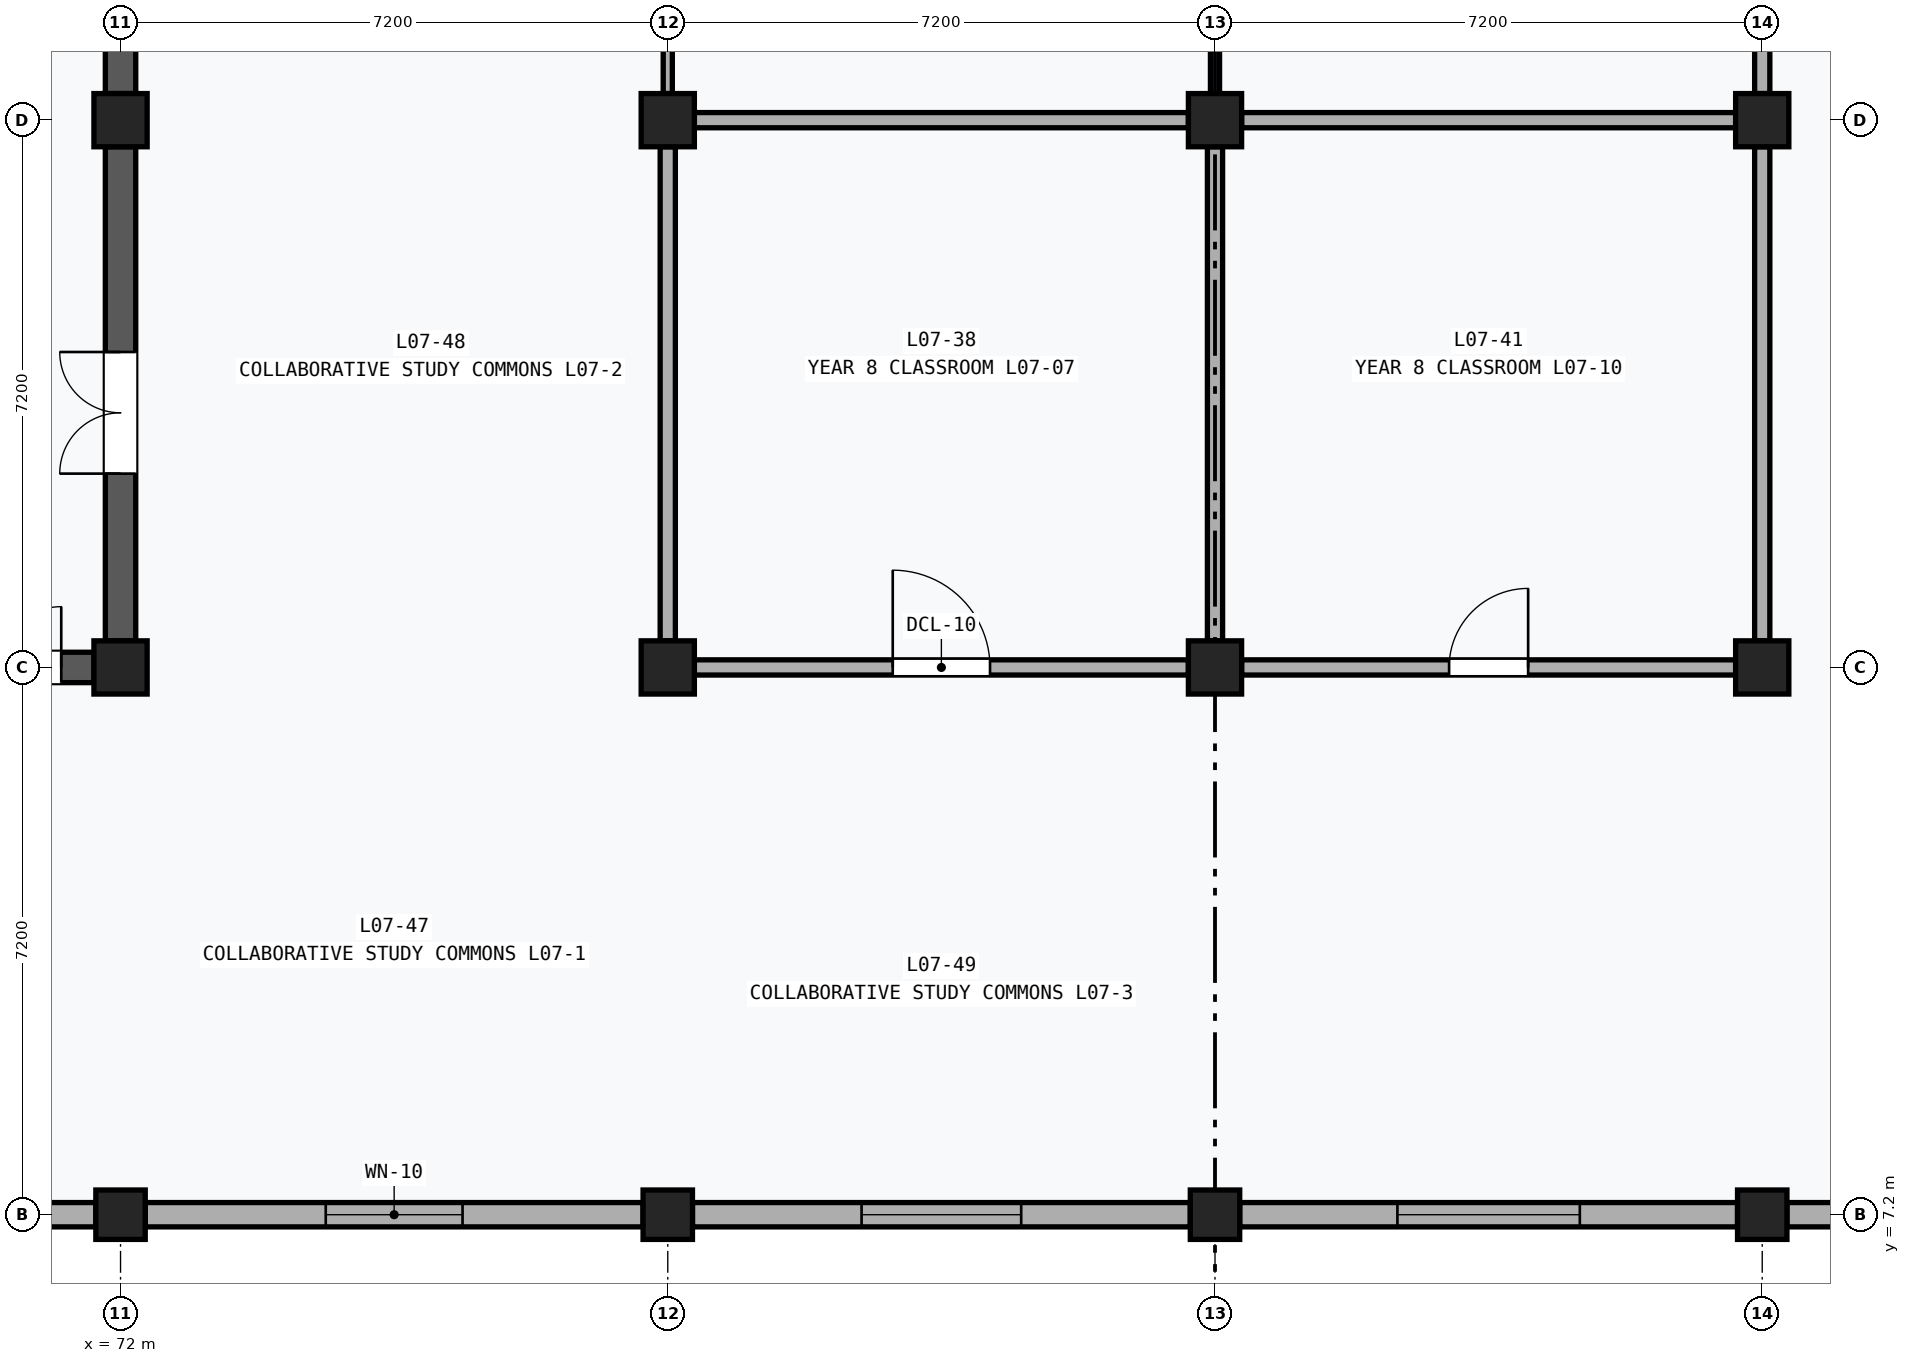
"""IFC4 building model, lengths in metres.
Left out: names, types, materials, properties, quantities, classifications, styles, units other than length and angle.
Written with IfcOpenShell. Run it as: python <this file> out.ifc"""

import sys

from ifc_helpers import new_model, si_unit, direction, frame, frame_2d, origin, origin_2d, place, context, subcontext, project, spatial, rectangle, extrude, element, fill, save


model = new_model("IFC4")
c1 = context("Model", 3, precision=1e-05, world=origin(), true_north=direction((0.0, 1.0)))
c2 = subcontext(c1, "Body", "Model", "MODEL_VIEW")
j1 = project(units=[si_unit("LENGTHUNIT", "METRE"), si_unit("PLANEANGLEUNIT", "RADIAN")], contexts=[c1])
p1 = place(None, origin())
s1 = spatial("IfcSite", under=j1, at=p1, CompositionType="ELEMENT")
p2 = place(p1, origin())
s2 = spatial("IfcBuilding", under=s1, at=p2, CompositionType="ELEMENT")
p3 = place(p2, frame((0.0, 0.0, 30.6)))
s3 = spatial("IfcBuildingStorey", under=s2, at=p3, CompositionType="ELEMENT", Elevation=30.6)
p4 = place(p3, frame((72.0, 7.2, 0.0), z_axis=(0.0, 0.0, 1.0), x_axis=(1.0, 0.0, 0.0)))
e1 = element("IfcColumn", 1, at=p4, inside=s3, PredefinedType="COLUMN", context=c2, shape_type="SweptSolid", body=[
    extrude(rectangle(XDim=0.65, YDim=0.65, at=origin_2d()), origin(), (0.0, 0.0, 1.0), 4.2),
])
for number, where, z_axis, x_axis in (
    (2, (72.0, 14.4, 0.0), (0.0, 0.0, 1.0), (1.0, 0.0, 0.0)),
    (3, (72.0, 21.6, 0.0), (0.0, 0.0, 1.0), (1.0, 0.0, 0.0)),
):
    element("IfcColumn", number, at=place(p3, frame(where, z_axis=z_axis, x_axis=x_axis)), inside=s3, PredefinedType="COLUMN", context=c2, shape_type="SweptSolid", body=[
        extrude(rectangle(XDim=0.7, YDim=0.7, at=origin_2d()), origin(), (0.0, 0.0, 1.0), 4.2),
    ])
p5 = place(p3, frame((79.2, 7.2, 0.0), z_axis=(0.0, 0.0, 1.0), x_axis=(1.0, 0.0, 0.0)))
e4 = element("IfcColumn", 4, at=p5, inside=s3, PredefinedType="COLUMN", context=c2, shape_type="SweptSolid", body=[
    extrude(rectangle(XDim=0.65, YDim=0.65, at=origin_2d()), origin(), (0.0, 0.0, 1.0), 4.2),
])
for number, where, z_axis, x_axis in (
    (5, (79.2, 14.4, 0.0), (0.0, 0.0, 1.0), (1.0, 0.0, 0.0)),
    (6, (79.2, 21.6, 0.0), (0.0, 0.0, 1.0), (1.0, 0.0, 0.0)),
):
    element("IfcColumn", number, at=place(p3, frame(where, z_axis=z_axis, x_axis=x_axis)), inside=s3, PredefinedType="COLUMN", context=c2, shape_type="SweptSolid", body=[
        extrude(rectangle(XDim=0.7, YDim=0.7, at=origin_2d()), origin(), (0.0, 0.0, 1.0), 4.2),
    ])
p6 = place(p3, frame((86.4, 7.2, 0.0), z_axis=(0.0, 0.0, 1.0), x_axis=(1.0, 0.0, 0.0)))
e7 = element("IfcColumn", 7, at=p6, inside=s3, PredefinedType="COLUMN", context=c2, shape_type="SweptSolid", body=[
    extrude(rectangle(XDim=0.65, YDim=0.65, at=origin_2d()), origin(), (0.0, 0.0, 1.0), 4.2),
])
for number, where, z_axis, x_axis in (
    (8, (86.4, 14.4, 0.0), (0.0, 0.0, 1.0), (1.0, 0.0, 0.0)),
    (9, (86.4, 21.6, 0.0), (0.0, 0.0, 1.0), (1.0, 0.0, 0.0)),
):
    element("IfcColumn", number, at=place(p3, frame(where, z_axis=z_axis, x_axis=x_axis)), inside=s3, PredefinedType="COLUMN", context=c2, shape_type="SweptSolid", body=[
        extrude(rectangle(XDim=0.7, YDim=0.7, at=origin_2d()), origin(), (0.0, 0.0, 1.0), 4.2),
    ])
p7 = place(p3, frame((93.6, 7.2, 0.0), z_axis=(0.0, 0.0, 1.0), x_axis=(1.0, 0.0, 0.0)))
e10 = element("IfcColumn", 10, at=p7, inside=s3, PredefinedType="COLUMN", context=c2, shape_type="SweptSolid", body=[
    extrude(rectangle(XDim=0.65, YDim=0.65, at=origin_2d()), origin(), (0.0, 0.0, 1.0), 4.2),
])
for number, where, z_axis, x_axis in (
    (11, (93.6, 14.4, 0.0), (0.0, 0.0, 1.0), (1.0, 0.0, 0.0)),
    (12, (93.6, 21.6, 0.0), (0.0, 0.0, 1.0), (1.0, 0.0, 0.0)),
):
    element("IfcColumn", number, at=place(p3, frame(where, z_axis=z_axis, x_axis=x_axis)), inside=s3, PredefinedType="COLUMN", context=c2, shape_type="SweptSolid", body=[
        extrude(rectangle(XDim=0.7, YDim=0.7, at=origin_2d()), origin(), (0.0, 0.0, 1.0), 4.2),
    ])
p8 = place(p3, frame((65.05, 7.2, 0.0), z_axis=(0.0, 0.0, 1.0), x_axis=(1.0, 0.0, 0.0)))
e13 = element("IfcWall", 13, at=p8, inside=s3, PredefinedType="SOLIDWALL", context=c2, shape_type="SweptSolid", body=[
    extrude(rectangle(XDim=6.625, YDim=0.32, at=frame_2d((3.312, 0.0))), origin(), (0.0, 0.0, 1.0), 3.25),
])
p9 = place(p8, frame((1.613, 0.0, 0.9)))
e14 = element("IfcOpeningElement", 14, at=p9, cuts=e13, PredefinedType="OPENING", context=c2, shape_type="SweptSolid", body=[
    extrude(rectangle(XDim=3.4, YDim=1.8, at=frame_2d((1.7, 0.9))), frame((0.0, 0.172, 0.0), z_axis=(0.0, -1.0, 0.0), x_axis=(1.0, 0.0, 0.0)), (0.0, 0.0, 1.0), 0.344),
])
p10 = place(p3, frame((72.325, 7.2, 0.0), z_axis=(0.0, 0.0, 1.0), x_axis=(1.0, 0.0, 0.0)))
e15 = element("IfcWall", 15, at=p10, inside=s3, PredefinedType="SOLIDWALL", context=c2, shape_type="SweptSolid", body=[
    extrude(rectangle(XDim=6.55, YDim=0.32, at=frame_2d((3.275, 0.0))), origin(), (0.0, 0.0, 1.0), 3.25),
])
p11 = place(p10, frame((2.375, 0.0, 0.85)))
e16 = element("IfcOpeningElement", 16, at=p11, cuts=e15, PredefinedType="OPENING", context=c2, shape_type="SweptSolid", body=[
    extrude(rectangle(XDim=1.8, YDim=2.0, at=frame_2d((0.9, 1.0))), frame((0.0, 0.172, 0.0), z_axis=(0.0, -1.0, 0.0), x_axis=(1.0, 0.0, 0.0)), (0.0, 0.0, 1.0), 0.344),
])
p12 = place(p3, frame((79.525, 7.2, 0.0), z_axis=(0.0, 0.0, 1.0), x_axis=(1.0, 0.0, 0.0)))
e17 = element("IfcWall", 17, at=p12, inside=s3, PredefinedType="SOLIDWALL", context=c2, shape_type="SweptSolid", body=[
    extrude(rectangle(XDim=6.55, YDim=0.32, at=frame_2d((3.275, 0.0))), origin(), (0.0, 0.0, 1.0), 3.25),
])
p13 = place(p12, frame((2.225, 0.0, 0.85)))
e18 = element("IfcOpeningElement", 18, at=p13, cuts=e17, PredefinedType="OPENING", context=c2, shape_type="SweptSolid", body=[
    extrude(rectangle(XDim=2.1, YDim=2.0, at=frame_2d((1.05, 1.0))), frame((0.0, 0.172, 0.0), z_axis=(0.0, -1.0, 0.0), x_axis=(1.0, 0.0, 0.0)), (0.0, 0.0, 1.0), 0.344),
])
p14 = place(p3, frame((86.725, 7.2, 0.0), z_axis=(0.0, 0.0, 1.0), x_axis=(1.0, 0.0, 0.0)))
e19 = element("IfcWall", 19, at=p14, inside=s3, PredefinedType="SOLIDWALL", context=c2, shape_type="SweptSolid", body=[
    extrude(rectangle(XDim=6.55, YDim=0.32, at=frame_2d((3.275, 0.0))), origin(), (0.0, 0.0, 1.0), 3.25),
])
p15 = place(p14, frame((2.075, 0.0, 0.85)))
e20 = element("IfcOpeningElement", 20, at=p15, cuts=e19, PredefinedType="OPENING", context=c2, shape_type="SweptSolid", body=[
    extrude(rectangle(XDim=2.4, YDim=2.0, at=frame_2d((1.2, 1.0))), frame((0.0, 0.172, 0.0), z_axis=(0.0, -1.0, 0.0), x_axis=(1.0, 0.0, 0.0)), (0.0, 0.0, 1.0), 0.344),
])
p16 = place(p3, frame((93.925, 7.2, 0.0), z_axis=(0.0, 0.0, 1.0), x_axis=(1.0, 0.0, 0.0)))
e21 = element("IfcWall", 21, at=p16, inside=s3, PredefinedType="SOLIDWALL", context=c2, shape_type="SweptSolid", body=[
    extrude(rectangle(XDim=6.625, YDim=0.32, at=frame_2d((3.312, 0.0))), origin(), (0.0, 0.0, 1.0), 3.25),
])
p17 = place(p16, frame((1.962, 0.0, 0.85)))
e22 = element("IfcOpeningElement", 22, at=p17, cuts=e21, PredefinedType="OPENING", context=c2, shape_type="SweptSolid", body=[
    extrude(rectangle(XDim=2.7, YDim=2.0, at=frame_2d((1.35, 1.0))), frame((0.0, 0.172, 0.0), z_axis=(0.0, -1.0, 0.0), x_axis=(1.0, 0.0, 0.0)), (0.0, 0.0, 1.0), 0.344),
])
p18 = place(p3, frame((72.0, 14.75, 0.0), z_axis=(0.0, 0.0, 1.0), x_axis=(0.0, 1.0, 0.0)))
e23 = element("IfcWall", 23, at=p18, inside=s3, PredefinedType="SHEAR", context=c2, shape_type="SweptSolid", body=[
    extrude(rectangle(XDim=6.5, YDim=0.4, at=frame_2d((3.25, 0.0))), origin(), (0.0, 0.0, 1.0), 3.11),
])
p19 = place(p18, frame((2.2, 0.0, 0.0)))
e24 = element("IfcOpeningElement", 24, at=p19, cuts=e23, PredefinedType="OPENING", context=c2, shape_type="SweptSolid", body=[
    extrude(rectangle(XDim=1.6, YDim=2.2, at=frame_2d((0.8, 1.1))), frame((0.0, 0.212, 0.0), z_axis=(0.0, -1.0, 0.0), x_axis=(1.0, 0.0, 0.0)), (0.0, 0.0, 1.0), 0.424),
])
p20 = place(p3, frame((72.0, 21.95, 0.0), z_axis=(0.0, 0.0, 1.0), x_axis=(0.0, 1.0, 0.0)))
e25 = element("IfcWall", 25, at=p20, inside=s3, PredefinedType="SHEAR", context=c2, shape_type="SweptSolid", body=[
    extrude(rectangle(XDim=6.5, YDim=0.4, at=frame_2d((3.25, 0.0))), origin(), (0.0, 0.0, 1.0), 3.11),
])
p21 = place(p3, frame((65.15, 14.4, 0.0), z_axis=(0.0, 0.0, 1.0), x_axis=(1.0, 0.0, 0.0)))
e26 = element("IfcWall", 26, at=p21, inside=s3, PredefinedType="SHEAR", context=c2, shape_type="SweptSolid", body=[
    extrude(rectangle(XDim=6.5, YDim=0.4, at=frame_2d((3.25, 0.0))), origin(), (0.0, 0.0, 1.0), 3.11),
])
p22 = place(p21, frame((4.47, 0.0, 0.0)))
e27 = element("IfcOpeningElement", 27, at=p22, cuts=e26, PredefinedType="OPENING", context=c2, shape_type="SweptSolid", body=[
    extrude(rectangle(XDim=1.6, YDim=2.2, at=frame_2d((0.8, 1.1))), frame((0.0, 0.212, 0.0), z_axis=(0.0, -1.0, 0.0), x_axis=(1.0, 0.0, 0.0)), (0.0, 0.0, 1.0), 0.424),
])
p23 = place(p3, frame((79.55, 14.4, 0.0), z_axis=(0.0, 0.0, 1.0), x_axis=(1.0, 0.0, 0.0)))
e28 = element("IfcWall", 28, at=p23, inside=s3, PredefinedType="PARTITIONING", context=c2, shape_type="SweptSolid", body=[
    extrude(rectangle(XDim=6.5, YDim=0.2, at=frame_2d((3.25, 0.0))), origin(), (0.0, 0.0, 1.0), 3.11),
])
p24 = place(p23, frame((2.61, 0.0, 0.0)))
e29 = element("IfcOpeningElement", 29, at=p24, cuts=e28, PredefinedType="OPENING", context=c2, shape_type="SweptSolid", body=[
    extrude(rectangle(XDim=1.28, YDim=2.28, at=frame_2d((0.64, 1.14))), frame((0.0, 0.112, 0.0), z_axis=(0.0, -1.0, 0.0), x_axis=(1.0, 0.0, 0.0)), (0.0, 0.0, 1.0), 0.224),
])
for number, where, z_axis, x_axis in (
    (30, (79.55, 21.6, 0.0), (0.0, 0.0, 1.0), (1.0, 0.0, 0.0)),
    (31, (79.2, 14.75, 0.0), (0.0, 0.0, 1.0), (0.0, 1.0, 0.0)),
    (32, (86.4, 14.75, 0.0), (0.0, 0.0, 1.0), (0.0, 1.0, 0.0)),
):
    element("IfcWall", number, at=place(p3, frame(where, z_axis=z_axis, x_axis=x_axis)), inside=s3, PredefinedType="PARTITIONING", context=c2, shape_type="SweptSolid", body=[
        extrude(rectangle(XDim=6.5, YDim=0.2, at=frame_2d((3.25, 0.0))), origin(), (0.0, 0.0, 1.0), 3.11),
    ])
p25 = place(p3, frame((79.2, 21.95, 0.0), z_axis=(0.0, 0.0, 1.0), x_axis=(0.0, 1.0, 0.0)))
e33 = element("IfcWall", 33, at=p25, inside=s3, PredefinedType="MOVABLE", context=c2, shape_type="SweptSolid", body=[
    extrude(rectangle(XDim=6.5, YDim=0.12, at=frame_2d((3.25, 0.0))), origin(), (0.0, 0.0, 1.0), 3.11),
])
p26 = place(p25, frame((2.75, 0.0, 0.0)))
e34 = element("IfcOpeningElement", 34, at=p26, cuts=e33, PredefinedType="OPENING", context=c2, shape_type="SweptSolid", body=[
    extrude(rectangle(XDim=1.0, YDim=2.1, at=frame_2d((0.5, 1.05))), frame((0.0, 0.072, 0.0), z_axis=(0.0, -1.0, 0.0), x_axis=(1.0, 0.0, 0.0)), (0.0, 0.0, 1.0), 0.144),
])
p27 = place(p3, frame((86.4, 21.95, 0.0), z_axis=(0.0, 0.0, 1.0), x_axis=(0.0, 1.0, 0.0)))
e35 = element("IfcWall", 35, at=p27, inside=s3, PredefinedType="MOVABLE", context=c2, shape_type="SweptSolid", body=[
    extrude(rectangle(XDim=6.5, YDim=0.12, at=frame_2d((3.25, 0.0))), origin(), (0.0, 0.0, 1.0), 3.11),
])
p28 = place(p3, frame((86.75, 14.4, 0.0), z_axis=(0.0, 0.0, 1.0), x_axis=(1.0, 0.0, 0.0)))
e36 = element("IfcWall", 36, at=p28, inside=s3, PredefinedType="PARTITIONING", context=c2, shape_type="SweptSolid", body=[
    extrude(rectangle(XDim=6.5, YDim=0.2, at=frame_2d((3.25, 0.0))), origin(), (0.0, 0.0, 1.0), 3.11),
])
p29 = place(p28, frame((2.73, 0.0, 0.0)))
e37 = element("IfcOpeningElement", 37, at=p29, cuts=e36, PredefinedType="OPENING", context=c2, shape_type="SweptSolid", body=[
    extrude(rectangle(XDim=1.04, YDim=2.14, at=frame_2d((0.52, 1.07))), frame((0.0, 0.112, 0.0), z_axis=(0.0, -1.0, 0.0), x_axis=(1.0, 0.0, 0.0)), (0.0, 0.0, 1.0), 0.224),
])
for number, where, z_axis, x_axis in (
    (38, (86.75, 21.6, 0.0), (0.0, 0.0, 1.0), (1.0, 0.0, 0.0)),
    (39, (93.6, 14.75, 0.0), (0.0, 0.0, 1.0), (0.0, 1.0, 0.0)),
):
    element("IfcWall", number, at=place(p3, frame(where, z_axis=z_axis, x_axis=x_axis)), inside=s3, PredefinedType="PARTITIONING", context=c2, shape_type="SweptSolid", body=[
        extrude(rectangle(XDim=6.5, YDim=0.2, at=frame_2d((3.25, 0.0))), origin(), (0.0, 0.0, 1.0), 3.11),
    ])
p30 = place(p3, frame((93.6, 21.95, 0.0), z_axis=(0.0, 0.0, 1.0), x_axis=(0.0, 1.0, 0.0)))
e40 = element("IfcWall", 40, at=p30, inside=s3, PredefinedType="PARTITIONING", context=c2, shape_type="SweptSolid", body=[
    extrude(rectangle(XDim=6.5, YDim=0.2, at=frame_2d((3.25, 0.0))), origin(), (0.0, 0.0, 1.0), 3.11),
])
p31 = place(p30, frame((2.72, 0.0, 0.0)))
e41 = element("IfcOpeningElement", 41, at=p31, cuts=e40, PredefinedType="OPENING", context=c2, shape_type="SweptSolid", body=[
    extrude(rectangle(XDim=1.06, YDim=2.16, at=frame_2d((0.53, 1.08))), frame((0.0, 0.112, 0.0), z_axis=(0.0, -1.0, 0.0), x_axis=(1.0, 0.0, 0.0)), (0.0, 0.0, 1.0), 0.224),
])
p32 = place(p11, origin())
e42 = element("IfcWindow", 42, at=p32, inside=s3, PartitioningType="SINGLE_PANEL", PredefinedType="WINDOW", context=c2, shape_type="SweptSolid", body=[
    extrude(rectangle(XDim=1.8, YDim=2.0, at=frame_2d((0.9, 1.0))), frame((0.0, 0.03, 0.0), z_axis=(0.0, -1.0, 0.0), x_axis=(1.0, 0.0, 0.0)), (0.0, 0.0, 1.0), 0.06),
])
fill(e16, e42)
p33 = place(p13, origin())
e43 = element("IfcWindow", 43, at=p33, inside=s3, PartitioningType="SINGLE_PANEL", PredefinedType="WINDOW", context=c2, shape_type="SweptSolid", body=[
    extrude(rectangle(XDim=2.1, YDim=2.0, at=frame_2d((1.05, 1.0))), frame((0.0, 0.03, 0.0), z_axis=(0.0, -1.0, 0.0), x_axis=(1.0, 0.0, 0.0)), (0.0, 0.0, 1.0), 0.06),
])
fill(e18, e43)
p34 = place(p15, origin())
e44 = element("IfcWindow", 44, at=p34, inside=s3, PartitioningType="SINGLE_PANEL", PredefinedType="WINDOW", context=c2, shape_type="SweptSolid", body=[
    extrude(rectangle(XDim=2.4, YDim=2.0, at=frame_2d((1.2, 1.0))), frame((0.0, 0.03, 0.0), z_axis=(0.0, -1.0, 0.0), x_axis=(1.0, 0.0, 0.0)), (0.0, 0.0, 1.0), 0.06),
])
fill(e20, e44)
p35 = place(p19, origin())
e45 = element("IfcDoor", 45, at=p35, inside=s3, OperationType="DOUBLE_DOOR_SINGLE_SWING", PredefinedType="DOOR", context=c2, shape_type="SweptSolid", body=[
    extrude(rectangle(XDim=1.6, YDim=2.2, at=frame_2d((0.8, 1.1))), frame((0.0, 0.025, 0.0), z_axis=(0.0, -1.0, 0.0), x_axis=(1.0, 0.0, 0.0)), (0.0, 0.0, 1.0), 0.05),
])
fill(e24, e45)
p36 = place(p22, origin())
e46 = element("IfcDoor", 46, at=p36, inside=s3, OperationType="DOUBLE_DOOR_SINGLE_SWING", PredefinedType="DOOR", context=c2, shape_type="SweptSolid", body=[
    extrude(rectangle(XDim=1.6, YDim=2.2, at=frame_2d((0.8, 1.1))), frame((0.0, 0.025, 0.0), z_axis=(0.0, -1.0, 0.0), x_axis=(1.0, 0.0, 0.0)), (0.0, 0.0, 1.0), 0.05),
])
fill(e27, e46)
p37 = place(p24, origin())
e47 = element("IfcDoor", 47, at=p37, inside=s3, OperationType="SINGLE_SWING_LEFT", PredefinedType="DOOR", context=c2, shape_type="SweptSolid", body=[
    extrude(rectangle(XDim=1.28, YDim=2.28, at=frame_2d((0.64, 1.14))), frame((0.0, 0.025, 0.0), z_axis=(0.0, -1.0, 0.0), x_axis=(1.0, 0.0, 0.0)), (0.0, 0.0, 1.0), 0.05),
])
fill(e29, e47)
p38 = place(p29, origin())
e48 = element("IfcDoor", 48, at=p38, inside=s3, OperationType="SINGLE_SWING_RIGHT", PredefinedType="DOOR", context=c2, shape_type="SweptSolid", body=[
    extrude(rectangle(XDim=1.04, YDim=2.14, at=frame_2d((0.52, 1.07))), frame((0.0, 0.025, 0.0), z_axis=(0.0, -1.0, 0.0), x_axis=(1.0, 0.0, 0.0)), (0.0, 0.0, 1.0), 0.05),
])
fill(e37, e48)
save(model, sys.argv[1])
